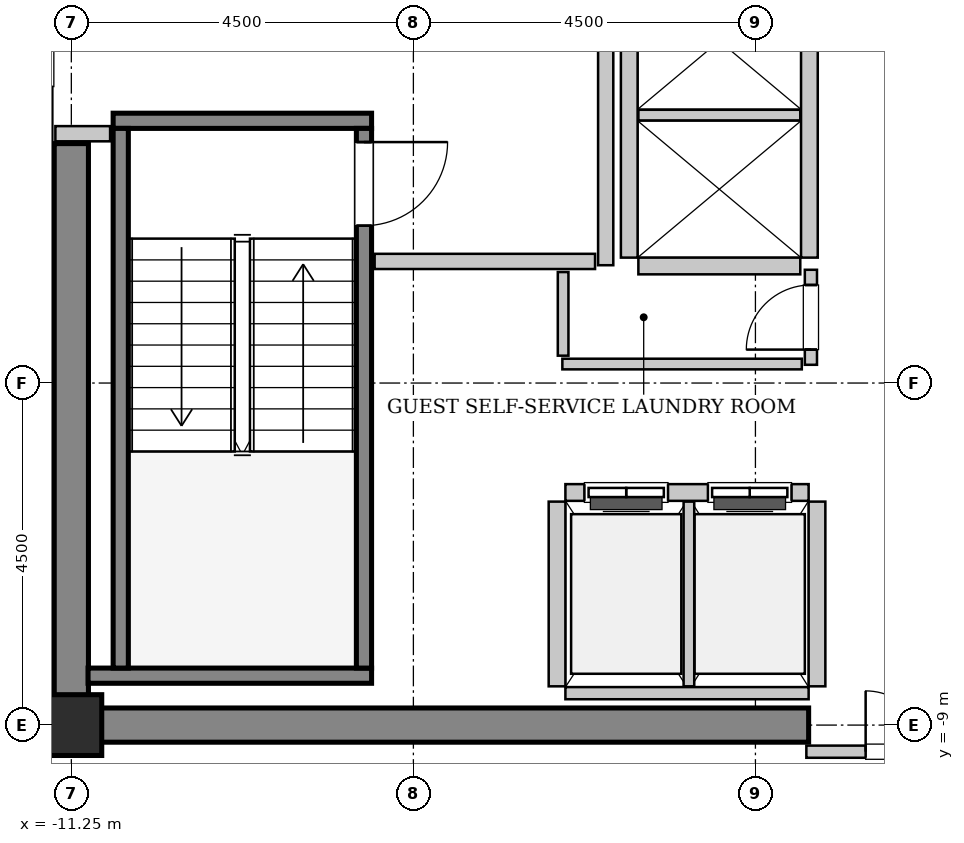
"""IFC4 building model, lengths in metres.
Left out: names, types, materials, properties, quantities, classifications, styles, units other than length and angle.
Written with IfcOpenShell. Run it as: python <this file> out.ifc"""

import sys

from ifc_helpers import new_model, si_unit, direction, frame, frame_2d, origin, origin_2d, place, context, subcontext, project, spatial, rectangle, hollow_rectangle, extrude, source, transform, mapped, element, fill, save


model = new_model("IFC4")
c1 = context("Model", 3, precision=1e-05, world=origin(), true_north=direction((0.0, 1.0)))
c2 = subcontext(c1, "Body", "Model", "MODEL_VIEW")
j1 = project(units=[si_unit("LENGTHUNIT", "METRE"), si_unit("PLANEANGLEUNIT", "RADIAN")], contexts=[c1])
p1 = place(None, origin())
s1 = spatial("IfcSite", under=j1, at=p1, CompositionType="ELEMENT")
p2 = place(p1, origin())
s2 = spatial("IfcBuilding", under=s1, at=p2, CompositionType="ELEMENT")
p3 = place(p2, frame((0.0, 0.0, 237.0)))
s3 = spatial("IfcBuildingStorey", under=s2, at=p3, CompositionType="ELEMENT", Elevation=237.0)
m1 = source(origin(), c2, "Body", "SweptSolid", [
    extrude(rectangle(XDim=9.925, YDim=0.45, at=frame_2d((4.962, 0.0))), origin(), (0.0, 0.0, 1.0), 3.8),
])
p4 = place(p3, frame((-11.475, -9.0, 0.0), z_axis=(0.0, 0.0, 1.0), x_axis=(1.0, 0.0, 0.0)))
e1 = element("IfcWall", 1, at=p4, inside=s3, PredefinedType="SHEAR", context=c2, shape_type="MappedRepresentation", body=[
    mapped(m1, transform((0.0, 0.0, 0.0), x_axis=(1.0, 0.0, 0.0), y_axis=(0.0, 1.0, 0.0), z_axis=(0.0, 0.0, 1.0), scale=1.0)),
])
m2 = source(origin(), c2, "Body", "SweptSolid", [
    extrude(rectangle(XDim=7.425, YDim=0.45, at=frame_2d((3.712, 0.0))), origin(), (0.0, 0.0, 1.0), 3.8),
])
p5 = place(p3, frame((-11.25, -8.775, 0.0), z_axis=(0.0, 0.0, 1.0), x_axis=(0.0, 1.0, 0.0)))
e2 = element("IfcWall", 2, at=p5, inside=s3, PredefinedType="SHEAR", context=c2, shape_type="MappedRepresentation", body=[
    mapped(m2, transform((0.0, 0.0, 0.0), x_axis=(1.0, 0.0, 0.0), y_axis=(0.0, 1.0, 0.0), z_axis=(0.0, 0.0, 1.0), scale=1.0)),
])
m3 = source(origin(), c2, "Body", "SweptSolid", [
    extrude(hollow_rectangle(XDim=0.8, YDim=0.8, WallThickness=0.04, InnerFilletRadius=0.04, OuterFilletRadius=0.08, at=origin_2d()), origin(), (0.0, 0.0, 1.0), 3.8),
])
p6 = place(p3, frame((-11.25, -9.0, 0.0), z_axis=(0.0, 0.0, 1.0), x_axis=(1.0, 0.0, 0.0)))
e3 = element("IfcColumn", 3, at=p6, inside=s3, PredefinedType="COLUMN", context=c2, shape_type="MappedRepresentation", body=[
    mapped(m3, transform((0.0, 0.0, 0.0), x_axis=(1.0, 0.0, 0.0), y_axis=(0.0, 1.0, 0.0), z_axis=(0.0, 0.0, 1.0), scale=1.0)),
])
m4 = source(origin(), c2, "Body", "SweptSolid", [
    extrude(rectangle(XDim=3.4, YDim=0.2, at=frame_2d((1.7, 0.0))), origin(), (0.0, 0.0, 1.0), 3.8),
])
p7 = place(p3, frame((-10.7, -1.05, 0.0), z_axis=(0.0, 0.0, 1.0), x_axis=(1.0, 0.0, 0.0)))
e4 = element("IfcWall", 4, at=p7, inside=s3, PredefinedType="SOLIDWALL", context=c2, shape_type="MappedRepresentation", body=[
    mapped(m4, transform((0.0, 0.0, 0.0), x_axis=(1.0, 0.0, 0.0), y_axis=(0.0, 1.0, 0.0), z_axis=(0.0, 0.0, 1.0), scale=1.0)),
])
m5 = source(origin(), c2, "Body", "SweptSolid", [
    extrude(rectangle(XDim=3.73, YDim=0.2, at=frame_2d((1.865, 0.0))), origin(), (0.0, 0.0, 1.0), 3.8),
])
p8 = place(p3, frame((-11.03, -8.35, 0.0), z_axis=(0.0, 0.0, 1.0), x_axis=(1.0, 0.0, 0.0)))
e5 = element("IfcWall", 5, at=p8, inside=s3, PredefinedType="SOLIDWALL", context=c2, shape_type="MappedRepresentation", body=[
    mapped(m5, transform((0.0, 0.0, 0.0), x_axis=(1.0, 0.0, 0.0), y_axis=(0.0, 1.0, 0.0), z_axis=(0.0, 0.0, 1.0), scale=1.0)),
])
m6 = source(origin(), c2, "Body", "SweptSolid", [
    extrude(rectangle(XDim=7.1, YDim=0.2, at=frame_2d((3.55, 0.0))), origin(), (0.0, 0.0, 1.0), 3.8),
])
p9 = place(p3, frame((-10.6, -1.15, 0.0), z_axis=(0.0, 0.0, 1.0), x_axis=(0.0, -1.0, 0.0)))
e6 = element("IfcWall", 6, at=p9, inside=s3, PredefinedType="SOLIDWALL", context=c2, shape_type="MappedRepresentation", body=[
    mapped(m6, transform((0.0, 0.0, 0.0), x_axis=(1.0, 0.0, 0.0), y_axis=(0.0, 1.0, 0.0), z_axis=(0.0, 0.0, 1.0), scale=1.0)),
])
p10 = place(p3, frame((-7.4, -1.15, 0.0), z_axis=(0.0, 0.0, 1.0), x_axis=(0.0, -1.0, 0.0)))
e7 = element("IfcWall", 7, at=p10, inside=s3, PredefinedType="SOLIDWALL", context=c2, shape_type="MappedRepresentation", body=[
    mapped(m6, transform((0.0, 0.0, 0.0), x_axis=(1.0, 0.0, 0.0), y_axis=(0.0, 1.0, 0.0), z_axis=(0.0, 0.0, 1.0), scale=1.0)),
])
p11 = place(p10, frame((0.18, 0.0, 0.0)))
e8 = element("IfcOpeningElement", 8, at=p11, cuts=e7, PredefinedType="OPENING", context=c2, shape_type="SweptSolid", body=[
    extrude(rectangle(XDim=1.1, YDim=2.15, at=frame_2d((0.55, 1.075))), frame((0.0, 0.11, 0.0), z_axis=(0.0, -1.0, 0.0), x_axis=(1.0, 0.0, 0.0)), (0.0, 0.0, 1.0), 0.22),
])
m7 = source(origin(), c2, "Body", "SweptSolid", [
    extrude(rectangle(XDim=3.2, YDim=0.22, at=frame_2d((1.6, 0.0))), origin(), (0.0, 0.0, 1.0), 3.535),
])
p12 = place(p3, frame((-1.55, -5.94, 0.0), z_axis=(0.0, 0.0, 1.0), x_axis=(-1.0, 0.0, 0.0)))
e9 = element("IfcWall", 9, at=p12, inside=s3, PredefinedType="SOLIDWALL", context=c2, shape_type="MappedRepresentation", body=[
    mapped(m7, transform((0.0, 0.0, 0.0), x_axis=(1.0, 0.0, 0.0), y_axis=(0.0, 1.0, 0.0), z_axis=(0.0, 0.0, 1.0), scale=1.0)),
])
p13 = place(p12, frame((1.85, 0.0, 0.0)))
e10 = element("IfcOpeningElement", 10, at=p13, cuts=e9, PredefinedType="OPENING", context=c2, shape_type="SweptSolid", body=[
    extrude(rectangle(XDim=1.1, YDim=2.2, at=frame_2d((0.55, 1.1))), frame((0.0, 0.12, 0.0), z_axis=(0.0, -1.0, 0.0), x_axis=(1.0, 0.0, 0.0)), (0.0, 0.0, 1.0), 0.24),
])
p14 = place(p12, frame((0.225, 0.0, 0.0)))
e11 = element("IfcOpeningElement", 11, at=p14, cuts=e9, PredefinedType="OPENING", context=c2, shape_type="SweptSolid", body=[
    extrude(rectangle(XDim=1.1, YDim=2.2, at=frame_2d((0.55, 1.1))), frame((0.0, 0.12, 0.0), z_axis=(0.0, -1.0, 0.0), x_axis=(1.0, 0.0, 0.0)), (0.0, 0.0, 1.0), 0.24),
])
m8 = source(origin(), c2, "Body", "SweptSolid", [
    extrude(rectangle(XDim=3.2, YDim=0.16, at=frame_2d((1.6, 0.0))), origin(), (0.0, 0.0, 1.0), 2.625),
])
p15 = place(p3, frame((-4.75, -8.58, 0.0), z_axis=(0.0, 0.0, 1.0), x_axis=(1.0, 0.0, 0.0)))
e12 = element("IfcWall", 12, at=p15, inside=s3, PredefinedType="PARTITIONING", context=c2, shape_type="MappedRepresentation", body=[
    mapped(m8, transform((0.0, 0.0, 0.0), x_axis=(1.0, 0.0, 0.0), y_axis=(0.0, 1.0, 0.0), z_axis=(0.0, 0.0, 1.0), scale=1.0)),
])
m9 = source(origin(), c2, "Body", "SweptSolid", [
    extrude(rectangle(XDim=2.43, YDim=0.22, at=frame_2d((1.215, 0.0))), origin(), (0.0, 0.0, 1.0), 3.535),
])
p16 = place(p3, frame((-4.86, -6.06, 0.0), z_axis=(0.0, 0.0, 1.0), x_axis=(0.0, -1.0, 0.0)))
e13 = element("IfcWall", 13, at=p16, inside=s3, PredefinedType="SOLIDWALL", context=c2, shape_type="MappedRepresentation", body=[
    mapped(m9, transform((0.0, 0.0, 0.0), x_axis=(1.0, 0.0, 0.0), y_axis=(0.0, 1.0, 0.0), z_axis=(0.0, 0.0, 1.0), scale=1.0)),
])
m10 = source(origin(), c2, "Body", "SweptSolid", [
    extrude(rectangle(XDim=2.43, YDim=0.14, at=frame_2d((1.215, 0.0))), origin(), (0.0, 0.0, 1.0), 3.535),
])
p17 = place(p3, frame((-3.125, -8.49, 0.0), z_axis=(0.0, 0.0, 1.0), x_axis=(0.0, 1.0, 0.0)))
e14 = element("IfcWall", 14, at=p17, inside=s3, PredefinedType="PARTITIONING", context=c2, shape_type="MappedRepresentation", body=[
    mapped(m10, transform((0.0, 0.0, 0.0), x_axis=(1.0, 0.0, 0.0), y_axis=(0.0, 1.0, 0.0), z_axis=(0.0, 0.0, 1.0), scale=1.0)),
])
p18 = place(p3, frame((-1.44, -8.49, 0.0), z_axis=(0.0, 0.0, 1.0), x_axis=(0.0, 1.0, 0.0)))
e15 = element("IfcWall", 15, at=p18, inside=s3, PredefinedType="SOLIDWALL", context=c2, shape_type="MappedRepresentation", body=[
    mapped(m9, transform((0.0, 0.0, 0.0), x_axis=(1.0, 0.0, 0.0), y_axis=(0.0, 1.0, 0.0), z_axis=(0.0, 0.0, 1.0), scale=1.0)),
])
m11 = source(origin(), c2, "Body", "SweptSolid", [
    extrude(rectangle(XDim=5.7, YDim=0.22, at=frame_2d((2.85, 0.0))), origin(), (0.0, 0.0, 1.0), 3.535),
])
for number, where, z_axis, x_axis in (
    (16, (-1.54, -2.85, 0.0), (0.0, 0.0, 1.0), (0.0, 1.0, 0.0)),
    (17, (-3.91, 2.85, 0.0), (0.0, 0.0, 1.0), (0.0, -1.0, 0.0)),
):
    element("IfcWall", number, at=place(p3, frame(where, z_axis=z_axis, x_axis=x_axis)), inside=s3, PredefinedType="SOLIDWALL", context=c2, shape_type="MappedRepresentation", body=[
        mapped(m11, transform((0.0, 0.0, 0.0), x_axis=(1.0, 0.0, 0.0), y_axis=(0.0, 1.0, 0.0), z_axis=(0.0, 0.0, 1.0), scale=1.0)),
    ])
m12 = source(origin(), c2, "Body", "SweptSolid", [
    extrude(rectangle(XDim=2.13, YDim=0.22, at=frame_2d((1.065, 0.0))), origin(), (0.0, 0.0, 1.0), 3.535),
])
p19 = place(p3, frame((-3.79, -2.96, 0.0), z_axis=(0.0, 0.0, 1.0), x_axis=(1.0, 0.0, 0.0)))
e18 = element("IfcWall", 18, at=p19, inside=s3, PredefinedType="SOLIDWALL", context=c2, shape_type="MappedRepresentation", body=[
    mapped(m12, transform((0.0, 0.0, 0.0), x_axis=(1.0, 0.0, 0.0), y_axis=(0.0, 1.0, 0.0), z_axis=(0.0, 0.0, 1.0), scale=1.0)),
])
m13 = source(origin(), c2, "Body", "SweptSolid", [
    extrude(rectangle(XDim=2.13, YDim=0.14, at=frame_2d((1.065, 0.0))), origin(), (0.0, 0.0, 1.0), 3.535),
])
p20 = place(p3, frame((-3.79, -0.975, 0.0), z_axis=(0.0, 0.0, 1.0), x_axis=(1.0, 0.0, 0.0)))
e19 = element("IfcWall", 19, at=p20, inside=s3, PredefinedType="PARTITIONING", context=c2, shape_type="MappedRepresentation", body=[
    mapped(m13, transform((0.0, 0.0, 0.0), x_axis=(1.0, 0.0, 0.0), y_axis=(0.0, 1.0, 0.0), z_axis=(0.0, 0.0, 1.0), scale=1.0)),
])
m14 = source(origin(), c2, "Body", "SweptSolid", [
    extrude(rectangle(XDim=5.9, YDim=0.2, at=frame_2d((2.95, 0.0))), origin(), (0.0, 0.0, 1.0), 3.535),
])
p21 = place(p3, frame((-4.22, -2.95, 0.0), z_axis=(0.0, 0.0, 1.0), x_axis=(0.0, 1.0, 0.0)))
e20 = element("IfcWall", 20, at=p21, inside=s3, PredefinedType="PARTITIONING", context=c2, shape_type="MappedRepresentation", body=[
    mapped(m14, transform((0.0, 0.0, 0.0), x_axis=(1.0, 0.0, 0.0), y_axis=(0.0, 1.0, 0.0), z_axis=(0.0, 0.0, 1.0), scale=1.0)),
])
m15 = source(origin(), c2, "Body", "SweptSolid", [
    extrude(rectangle(XDim=2.9, YDim=0.2, at=frame_2d((1.45, 0.0))), origin(), (0.0, 0.0, 1.0), 3.535),
])
p22 = place(p3, frame((-7.26, -2.9, 0.0), z_axis=(0.0, 0.0, 1.0), x_axis=(1.0, 0.0, 0.0)))
e21 = element("IfcWall", 21, at=p22, inside=s3, PredefinedType="PARTITIONING", context=c2, shape_type="MappedRepresentation", body=[
    mapped(m15, transform((0.0, 0.0, 0.0), x_axis=(1.0, 0.0, 0.0), y_axis=(0.0, 1.0, 0.0), z_axis=(0.0, 0.0, 1.0), scale=1.0)),
])
m16 = source(origin(), c2, "Body", "SweptSolid", [
    extrude(rectangle(XDim=0.72, YDim=0.2, at=frame_2d((0.36, 0.0))), origin(), (0.0, 0.0, 1.0), 3.535),
])
p23 = place(p3, frame((-11.46, -1.22, 0.0), z_axis=(0.0, 0.0, 1.0), x_axis=(1.0, 0.0, 0.0)))
e22 = element("IfcWall", 22, at=p23, inside=s3, PredefinedType="PARTITIONING", context=c2, shape_type="MappedRepresentation", body=[
    mapped(m16, transform((0.0, 0.0, 0.0), x_axis=(1.0, 0.0, 0.0), y_axis=(0.0, 1.0, 0.0), z_axis=(0.0, 0.0, 1.0), scale=1.0)),
])
m17 = source(origin(), c2, "Body", "SweptSolid", [
    extrude(rectangle(XDim=3.16, YDim=0.16, at=frame_2d((1.58, 0.0))), origin(), (0.0, 0.0, 1.0), 2.625),
])
p24 = place(p3, frame((-1.58, -9.35, 0.0), z_axis=(0.0, 0.0, 1.0), x_axis=(1.0, 0.0, 0.0)))
e23 = element("IfcWall", 23, at=p24, inside=s3, PredefinedType="PARTITIONING", context=c2, shape_type="MappedRepresentation", body=[
    mapped(m17, transform((0.0, 0.0, 0.0), x_axis=(1.0, 0.0, 0.0), y_axis=(0.0, 1.0, 0.0), z_axis=(0.0, 0.0, 1.0), scale=1.0)),
])
p25 = place(p24, frame((0.78, 0.0, 0.0)))
e24 = element("IfcOpeningElement", 24, at=p25, cuts=e23, PredefinedType="OPENING", context=c2, shape_type="SweptSolid", body=[
    extrude(rectangle(XDim=1.6, YDim=2.3, at=frame_2d((0.8, 1.15))), frame((0.0, 0.09, 0.0), z_axis=(0.0, -1.0, 0.0), x_axis=(1.0, 0.0, 0.0)), (0.0, 0.0, 1.0), 0.18),
])
m18 = source(origin(), c2, "Body", "SweptSolid", [
    extrude(rectangle(XDim=1.25, YDim=0.16, at=frame_2d((0.625, 0.0))), origin(), (0.0, 0.0, 1.0), 3.535),
])
p26 = place(p3, frame((-1.52, -4.26, 0.0), z_axis=(0.0, 0.0, 1.0), x_axis=(0.0, 1.0, 0.0)))
e25 = element("IfcWall", 25, at=p26, inside=s3, PredefinedType="PARTITIONING", context=c2, shape_type="MappedRepresentation", body=[
    mapped(m18, transform((0.0, 0.0, 0.0), x_axis=(1.0, 0.0, 0.0), y_axis=(0.0, 1.0, 0.0), z_axis=(0.0, 0.0, 1.0), scale=1.0)),
])
p27 = place(p26, frame((0.2, 0.0, 0.0)))
e26 = element("IfcOpeningElement", 26, at=p27, cuts=e25, PredefinedType="OPENING", context=c2, shape_type="SweptSolid", body=[
    extrude(rectangle(XDim=0.85, YDim=2.1, at=frame_2d((0.425, 1.05))), frame((0.0, 0.09, 0.0), z_axis=(0.0, -1.0, 0.0), x_axis=(1.0, 0.0, 0.0)), (0.0, 0.0, 1.0), 0.18),
])
m19 = source(origin(), c2, "Body", "SweptSolid", [
    extrude(rectangle(XDim=3.15, YDim=0.14, at=frame_2d((1.575, 0.0))), origin(), (0.0, 0.0, 1.0), 3.535),
])
p28 = place(p3, frame((-4.79, -4.25, 0.0), z_axis=(0.0, 0.0, 1.0), x_axis=(1.0, 0.0, 0.0)))
e27 = element("IfcWall", 27, at=p28, inside=s3, PredefinedType="PARTITIONING", context=c2, shape_type="MappedRepresentation", body=[
    mapped(m19, transform((0.0, 0.0, 0.0), x_axis=(1.0, 0.0, 0.0), y_axis=(0.0, 1.0, 0.0), z_axis=(0.0, 0.0, 1.0), scale=1.0)),
])
m20 = source(origin(), c2, "Body", "SweptSolid", [
    extrude(rectangle(XDim=1.1, YDim=0.14, at=frame_2d((0.55, 0.0))), origin(), (0.0, 0.0, 1.0), 3.535),
])
p29 = place(p3, frame((-4.78, -4.14, 0.0), z_axis=(0.0, 0.0, 1.0), x_axis=(0.0, 1.0, 0.0)))
e28 = element("IfcWall", 28, at=p29, inside=s3, PredefinedType="PARTITIONING", context=c2, shape_type="MappedRepresentation", body=[
    mapped(m20, transform((0.0, 0.0, 0.0), x_axis=(1.0, 0.0, 0.0), y_axis=(0.0, 1.0, 0.0), z_axis=(0.0, 0.0, 1.0), scale=1.0)),
])
m21 = source(origin(), c2, "Body", "SweptSolid", [
    extrude(rectangle(XDim=1.1, YDim=2.15, at=frame_2d((0.55, 1.075))), frame((0.0, 0.025, 0.0), z_axis=(0.0, -1.0, 0.0), x_axis=(1.0, 0.0, 0.0)), (0.0, 0.0, 1.0), 0.05),
])
p30 = place(p11, origin())
e29 = element("IfcDoor", 29, at=p30, inside=s3, OperationType="SINGLE_SWING_LEFT", PredefinedType="DOOR", context=c2, shape_type="MappedRepresentation", body=[
    mapped(m21, transform((0.0, 0.0, 0.0), x_axis=(1.0, 0.0, 0.0), y_axis=(0.0, 1.0, 0.0), z_axis=(0.0, 0.0, 1.0), scale=1.0)),
])
fill(e8, e29)
m22 = source(origin(), c2, "Body", "SweptSolid", [
    extrude(rectangle(XDim=1.1, YDim=2.2, at=frame_2d((0.55, 1.1))), frame((0.0, 0.025, 0.0), z_axis=(0.0, -1.0, 0.0), x_axis=(1.0, 0.0, 0.0)), (0.0, 0.0, 1.0), 0.05),
])
p31 = place(p13, origin())
e30 = element("IfcDoor", 30, at=p31, inside=s3, OperationType="DOUBLE_DOOR_SLIDING", PredefinedType="DOOR", context=c2, shape_type="MappedRepresentation", body=[
    mapped(m22, transform((0.0, 0.0, 0.0), x_axis=(1.0, 0.0, 0.0), y_axis=(0.0, 1.0, 0.0), z_axis=(0.0, 0.0, 1.0), scale=1.0)),
])
fill(e10, e30)
p32 = place(p14, origin())
e31 = element("IfcDoor", 31, at=p32, inside=s3, OperationType="DOUBLE_DOOR_SLIDING", PredefinedType="DOOR", context=c2, shape_type="MappedRepresentation", body=[
    mapped(m22, transform((0.0, 0.0, 0.0), x_axis=(1.0, 0.0, 0.0), y_axis=(0.0, 1.0, 0.0), z_axis=(0.0, 0.0, 1.0), scale=1.0)),
])
fill(e11, e31)
m23 = source(origin(), c2, "Body", "SweptSolid", [
    extrude(rectangle(XDim=1.6, YDim=2.3, at=frame_2d((0.8, 1.15))), frame((0.0, 0.025, 0.0), z_axis=(0.0, -1.0, 0.0), x_axis=(1.0, 0.0, 0.0)), (0.0, 0.0, 1.0), 0.05),
])
p33 = place(p25, origin())
e32 = element("IfcDoor", 32, at=p33, inside=s3, OperationType="DOUBLE_DOOR_SINGLE_SWING", PredefinedType="DOOR", context=c2, shape_type="MappedRepresentation", body=[
    mapped(m23, transform((0.0, 0.0, 0.0), x_axis=(1.0, 0.0, 0.0), y_axis=(0.0, 1.0, 0.0), z_axis=(0.0, 0.0, 1.0), scale=1.0)),
])
fill(e24, e32)
m24 = source(origin(), c2, "Body", "SweptSolid", [
    extrude(rectangle(XDim=0.85, YDim=2.1, at=frame_2d((0.425, 1.05))), frame((0.0, 0.025, 0.0), z_axis=(0.0, -1.0, 0.0), x_axis=(1.0, 0.0, 0.0)), (0.0, 0.0, 1.0), 0.05),
])
p34 = place(p27, origin())
e33 = element("IfcDoor", 33, at=p34, inside=s3, OperationType="SINGLE_SWING_LEFT", PredefinedType="DOOR", context=c2, shape_type="MappedRepresentation", body=[
    mapped(m24, transform((0.0, 0.0, 0.0), x_axis=(1.0, 0.0, 0.0), y_axis=(0.0, 1.0, 0.0), z_axis=(0.0, 0.0, 1.0), scale=1.0)),
])
fill(e26, e33)
save(model, sys.argv[1])
